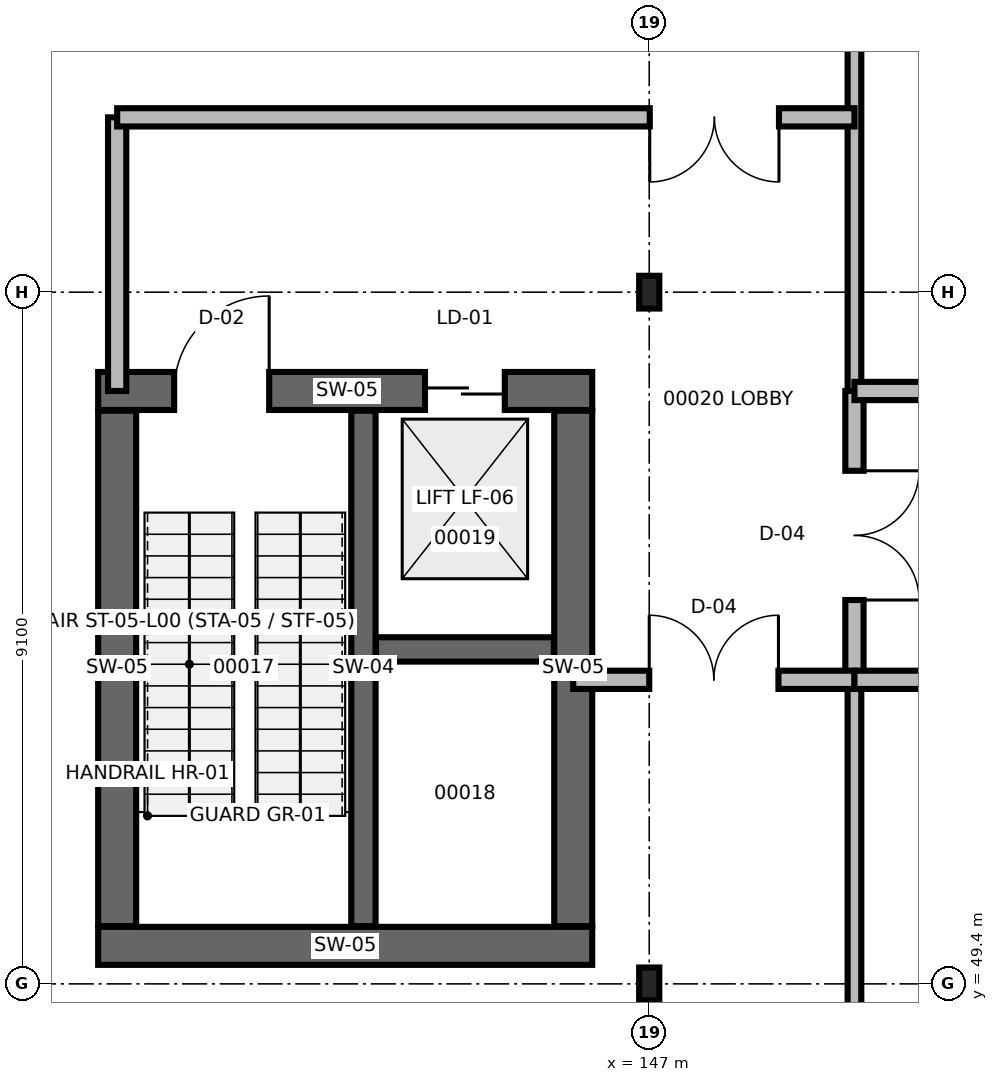
"""IFC4 building model, lengths in metres.
Left out: names, types, materials, properties, quantities, classifications, styles, units other than length and angle.
Written with IfcOpenShell. Run it as: python <this file> out.ifc"""

import sys

from ifc_helpers import new_model, si_unit, direction, frame, frame_2d, origin, origin_2d, place, context, subcontext, project, spatial, rectangle, i_section, extrude, element, fill, save


model = new_model("IFC4")
c1 = context("Model", 3, precision=1e-05, world=origin(), true_north=direction((0.0, 1.0)))
c2 = subcontext(c1, "Body", "Model", "MODEL_VIEW")
j1 = project(units=[si_unit("LENGTHUNIT", "METRE"), si_unit("PLANEANGLEUNIT", "RADIAN")], contexts=[c1])
p1 = place(None, origin())
s1 = spatial("IfcSite", under=j1, at=p1, CompositionType="ELEMENT")
p2 = place(p1, origin())
s2 = spatial("IfcBuilding", under=s1, at=p2, CompositionType="ELEMENT")
p3 = place(p2, origin())
s3 = spatial("IfcBuildingStorey", under=s2, at=p3, CompositionType="ELEMENT", Elevation=0.0)
for number, where, z_axis, x_axis in (
    (1, (147.0, 49.4, 0.0), (0.0, 0.0, 1.0), (1.0, 0.0, 0.0)),
    (2, (147.0, 58.5, 0.0), (0.0, 0.0, 1.0), (1.0, 0.0, 0.0)),
):
    element("IfcColumn", number, at=place(p3, frame(where, z_axis=z_axis, x_axis=x_axis)), inside=s3, PredefinedType="COLUMN", context=c2, shape_type="SweptSolid", body=[
        extrude(i_section(OverallWidth=0.265, OverallDepth=0.431, WebThickness=0.015, FlangeThickness=0.025, at=origin_2d()), origin(), (0.0, 0.0, 1.0), 5.1),
    ])
p4 = place(p3, frame((139.75, 49.9, 0.0), z_axis=(0.0, 0.0, 1.0), x_axis=(1.0, 0.0, 0.0)))
e3 = element("IfcWall", 3, at=p4, inside=s3, PredefinedType="SHEAR", context=c2, shape_type="SweptSolid", body=[
    extrude(rectangle(XDim=6.5, YDim=0.5, at=frame_2d((3.25, 0.0))), origin(), (0.0, 0.0, 1.0), 4.82),
])
p5 = place(p3, frame((139.75, 57.2, 0.0), z_axis=(0.0, 0.0, 1.0), x_axis=(1.0, 0.0, 0.0)))
e4 = element("IfcWall", 4, at=p5, inside=s3, PredefinedType="SHEAR", context=c2, shape_type="SweptSolid", body=[
    extrude(rectangle(XDim=6.5, YDim=0.5, at=frame_2d((3.25, 0.0))), origin(), (0.0, 0.0, 1.0), 4.82),
])
p6 = place(p5, frame((1.0, 0.0, 0.0)))
e5 = element("IfcOpeningElement", 5, at=p6, cuts=e4, PredefinedType="OPENING", context=c2, shape_type="SweptSolid", body=[
    extrude(rectangle(XDim=1.25, YDim=2.2, at=frame_2d((0.625, 1.1))), frame((0.0, 0.26, 0.0), z_axis=(0.0, -1.0, 0.0), x_axis=(1.0, 0.0, 0.0)), (0.0, 0.0, 1.0), 0.52),
])
p7 = place(p5, frame((4.3, 0.0, 0.0)))
e6 = element("IfcOpeningElement", 6, at=p7, cuts=e4, PredefinedType="OPENING", context=c2, shape_type="SweptSolid", body=[
    extrude(rectangle(XDim=1.05, YDim=2.15, at=frame_2d((0.525, 1.075))), frame((0.0, 0.26, 0.0), z_axis=(0.0, -1.0, 0.0), x_axis=(1.0, 0.0, 0.0)), (0.0, 0.0, 1.0), 0.52),
])
for number, where, z_axis, x_axis in (
    (7, (140.0, 50.16, 0.0), (0.0, 0.0, 1.0), (0.0, 1.0, 0.0)),
    (8, (146.0, 50.16, 0.0), (0.0, 0.0, 1.0), (0.0, 1.0, 0.0)),
):
    element("IfcWall", number, at=place(p3, frame(where, z_axis=z_axis, x_axis=x_axis)), inside=s3, PredefinedType="SHEAR", context=c2, shape_type="SweptSolid", body=[
        extrude(rectangle(XDim=6.78, YDim=0.5, at=frame_2d((3.39, 0.0))), origin(), (0.0, 0.0, 1.0), 4.82),
    ])
p8 = place(p3, frame((143.24, 50.16, 0.0), z_axis=(0.0, 0.0, 1.0), x_axis=(0.0, 1.0, 0.0)))
e9 = element("IfcWall", 9, at=p8, inside=s3, PredefinedType="SHEAR", context=c2, shape_type="SweptSolid", body=[
    extrude(rectangle(XDim=6.78, YDim=0.32, at=frame_2d((3.39, 0.0))), origin(), (0.0, 0.0, 1.0), 4.82),
])
p9 = place(p3, frame((143.405, 53.8, 0.0), z_axis=(0.0, 0.0, 1.0), x_axis=(1.0, 0.0, 0.0)))
e10 = element("IfcWall", 10, at=p9, inside=s3, PredefinedType="SHEAR", context=c2, shape_type="SweptSolid", body=[
    extrude(rectangle(XDim=2.34, YDim=0.32, at=frame_2d((1.17, 0.0))), origin(), (0.0, 0.0, 1.0), 4.82),
])
p10 = place(p3, frame((149.7, 41.6, 0.0), z_axis=(0.0, 0.0, 1.0), x_axis=(0.0, 1.0, 0.0)))
e11 = element("IfcWall", 11, at=p10, inside=s3, PredefinedType="PARTITIONING", context=c2, shape_type="SweptSolid", body=[
    extrude(rectangle(XDim=11.8, YDim=0.18, at=frame_2d((5.9, 0.0))), origin(), (0.0, 0.0, 1.0), 4.364),
])
p11 = place(p10, frame((5.39, 0.0, 0.0)))
e12 = element("IfcOpeningElement", 12, at=p11, cuts=e11, PredefinedType="OPENING", context=c2, shape_type="SweptSolid", body=[
    extrude(rectangle(XDim=1.02, YDim=2.2, at=frame_2d((0.51, 1.1))), frame((0.0, 0.1, 0.0), z_axis=(0.0, -1.0, 0.0), x_axis=(1.0, 0.0, 0.0)), (0.0, 0.0, 1.0), 0.2),
])
p12 = place(p3, frame((149.7, 53.4, 0.0), z_axis=(0.0, 0.0, 1.0), x_axis=(0.0, 1.0, 0.0)))
e13 = element("IfcWall", 13, at=p12, inside=s3, PredefinedType="SOLIDWALL", context=c2, shape_type="SweptSolid", body=[
    extrude(rectangle(XDim=3.8, YDim=0.24, at=frame_2d((1.9, 0.0))), origin(), (0.0, 0.0, 1.0), 4.72),
])
p13 = place(p12, frame((1.05, 0.0, 0.0)))
e14 = element("IfcOpeningElement", 14, at=p13, cuts=e13, PredefinedType="OPENING", context=c2, shape_type="SweptSolid", body=[
    extrude(rectangle(XDim=1.7, YDim=2.25, at=frame_2d((0.85, 1.125))), frame((0.0, 0.13, 0.0), z_axis=(0.0, -1.0, 0.0), x_axis=(1.0, 0.0, 0.0)), (0.0, 0.0, 1.0), 0.26),
])
p14 = place(p3, frame((149.7, 57.2, 0.0), z_axis=(0.0, 0.0, 1.0), x_axis=(0.0, 1.0, 0.0)))
e15 = element("IfcWall", 15, at=p14, inside=s3, PredefinedType="PARTITIONING", context=c2, shape_type="SweptSolid", body=[
    extrude(rectangle(XDim=19.0, YDim=0.18, at=frame_2d((9.5, 0.0))), origin(), (0.0, 0.0, 1.0), 4.183),
])
p15 = place(p14, frame((8.75, 0.0, 0.0)))
e16 = element("IfcOpeningElement", 16, at=p15, cuts=e15, PredefinedType="OPENING", context=c2, shape_type="SweptSolid", body=[
    extrude(rectangle(XDim=1.5, YDim=2.25, at=frame_2d((0.75, 1.125))), frame((0.0, 0.1, 0.0), z_axis=(0.0, -1.0, 0.0), x_axis=(1.0, 0.0, 0.0)), (0.0, 0.0, 1.0), 0.2),
])
p16 = place(p3, frame((140.0, 57.2, 0.0), z_axis=(0.0, 0.0, 1.0), x_axis=(0.0, 1.0, 0.0)))
e17 = element("IfcWall", 17, at=p16, inside=s3, PredefinedType="SOLIDWALL", context=c2, shape_type="SweptSolid", body=[
    extrude(rectangle(XDim=3.6, YDim=0.24, at=frame_2d((1.8, 0.0))), origin(), (0.0, 0.0, 1.0), 4.183),
])
p17 = place(p3, frame((140.0, 60.8, 0.0), z_axis=(0.0, 0.0, 1.0), x_axis=(1.0, 0.0, 0.0)))
e18 = element("IfcWall", 18, at=p17, inside=s3, PredefinedType="SOLIDWALL", context=c2, shape_type="SweptSolid", body=[
    extrude(rectangle(XDim=9.7, YDim=0.24, at=frame_2d((4.85, 0.0))), origin(), (0.0, 0.0, 1.0), 4.102),
])
p18 = place(p17, frame((7.007, 0.0, 0.0)))
e19 = element("IfcOpeningElement", 19, at=p18, cuts=e18, PredefinedType="OPENING", context=c2, shape_type="SweptSolid", body=[
    extrude(rectangle(XDim=1.7, YDim=2.25, at=frame_2d((0.85, 1.125))), frame((0.0, 0.13, 0.0), z_axis=(0.0, -1.0, 0.0), x_axis=(1.0, 0.0, 0.0)), (0.0, 0.0, 1.0), 0.26),
])
p19 = place(p3, frame((146.0, 53.4, 0.0), z_axis=(0.0, 0.0, 1.0), x_axis=(1.0, 0.0, 0.0)))
e20 = element("IfcWall", 20, at=p19, inside=s3, PredefinedType="SOLIDWALL", context=c2, shape_type="SweptSolid", body=[
    extrude(rectangle(XDim=3.7, YDim=0.24, at=frame_2d((1.85, 0.0))), origin(), (0.0, 0.0, 1.0), 4.102),
])
p20 = place(p19, frame((1.0, 0.0, 0.0)))
e21 = element("IfcOpeningElement", 21, at=p20, cuts=e20, PredefinedType="OPENING", context=c2, shape_type="SweptSolid", body=[
    extrude(rectangle(XDim=1.7, YDim=2.25, at=frame_2d((0.85, 1.125))), frame((0.0, 0.13, 0.0), z_axis=(0.0, -1.0, 0.0), x_axis=(1.0, 0.0, 0.0)), (0.0, 0.0, 1.0), 0.26),
])
for number, where, z_axis, x_axis in (
    (22, (149.7, 53.4, 0.0), (0.0, 0.0, 1.0), (1.0, 0.0, 0.0)),
    (23, (149.7, 57.2, 0.0), (0.0, 0.0, 1.0), (1.0, 0.0, 0.0)),
):
    element("IfcWall", number, at=place(p3, frame(where, z_axis=z_axis, x_axis=x_axis)), inside=s3, PredefinedType="SOLIDWALL", context=c2, shape_type="SweptSolid", body=[
        extrude(rectangle(XDim=30.0, YDim=0.24, at=frame_2d((15.0, 0.0))), origin(), (0.0, 0.0, 1.0), 4.102),
    ])
p21 = place(p6, origin())
e24 = element("IfcDoor", 24, at=p21, inside=s3, OperationType="SINGLE_SWING_RIGHT", PredefinedType="DOOR", context=c2, shape_type="SweptSolid", body=[
    extrude(rectangle(XDim=1.25, YDim=2.2, at=frame_2d((0.625, 1.1))), frame((0.0, 0.025, 0.0), z_axis=(0.0, -1.0, 0.0), x_axis=(1.0, 0.0, 0.0)), (0.0, 0.0, 1.0), 0.05),
])
fill(e5, e24)
p22 = place(p7, origin())
e25 = element("IfcDoor", 25, at=p22, inside=s3, OperationType="DOUBLE_DOOR_SLIDING", PredefinedType="DOOR", context=c2, shape_type="SweptSolid", body=[
    extrude(rectangle(XDim=1.05, YDim=2.15, at=frame_2d((0.525, 1.075))), frame((0.0, 0.025, 0.0), z_axis=(0.0, -1.0, 0.0), x_axis=(1.0, 0.0, 0.0)), (0.0, 0.0, 1.0), 0.05),
])
fill(e6, e25)
p23 = place(p13, frame((1.7, 0.0, 0.0), z_axis=(0.0, 0.0, 1.0), x_axis=(-1.0, 0.0, 0.0)))
e26 = element("IfcDoor", 26, at=p23, inside=s3, OperationType="DOUBLE_DOOR_SINGLE_SWING", PredefinedType="DOOR", context=c2, shape_type="SweptSolid", body=[
    extrude(rectangle(XDim=1.7, YDim=2.25, at=frame_2d((0.85, 1.125))), frame((0.0, 0.025, 0.0), z_axis=(0.0, -1.0, 0.0), x_axis=(1.0, 0.0, 0.0)), (0.0, 0.0, 1.0), 0.05),
])
fill(e14, e26)
p24 = place(p18, frame((1.7, 0.0, 0.0), z_axis=(0.0, 0.0, 1.0), x_axis=(-1.0, 0.0, 0.0)))
e27 = element("IfcDoor", 27, at=p24, inside=s3, OperationType="DOUBLE_DOOR_SINGLE_SWING", PredefinedType="DOOR", context=c2, shape_type="SweptSolid", body=[
    extrude(rectangle(XDim=1.7, YDim=2.25, at=frame_2d((0.85, 1.125))), frame((0.0, 0.025, 0.0), z_axis=(0.0, -1.0, 0.0), x_axis=(1.0, 0.0, 0.0)), (0.0, 0.0, 1.0), 0.05),
])
fill(e19, e27)
p25 = place(p20, origin())
e28 = element("IfcDoor", 28, at=p25, inside=s3, OperationType="DOUBLE_DOOR_SINGLE_SWING", PredefinedType="DOOR", context=c2, shape_type="SweptSolid", body=[
    extrude(rectangle(XDim=1.7, YDim=2.25, at=frame_2d((0.85, 1.125))), frame((0.0, 0.025, 0.0), z_axis=(0.0, -1.0, 0.0), x_axis=(1.0, 0.0, 0.0)), (0.0, 0.0, 1.0), 0.05),
])
fill(e21, e28)
save(model, sys.argv[1])
